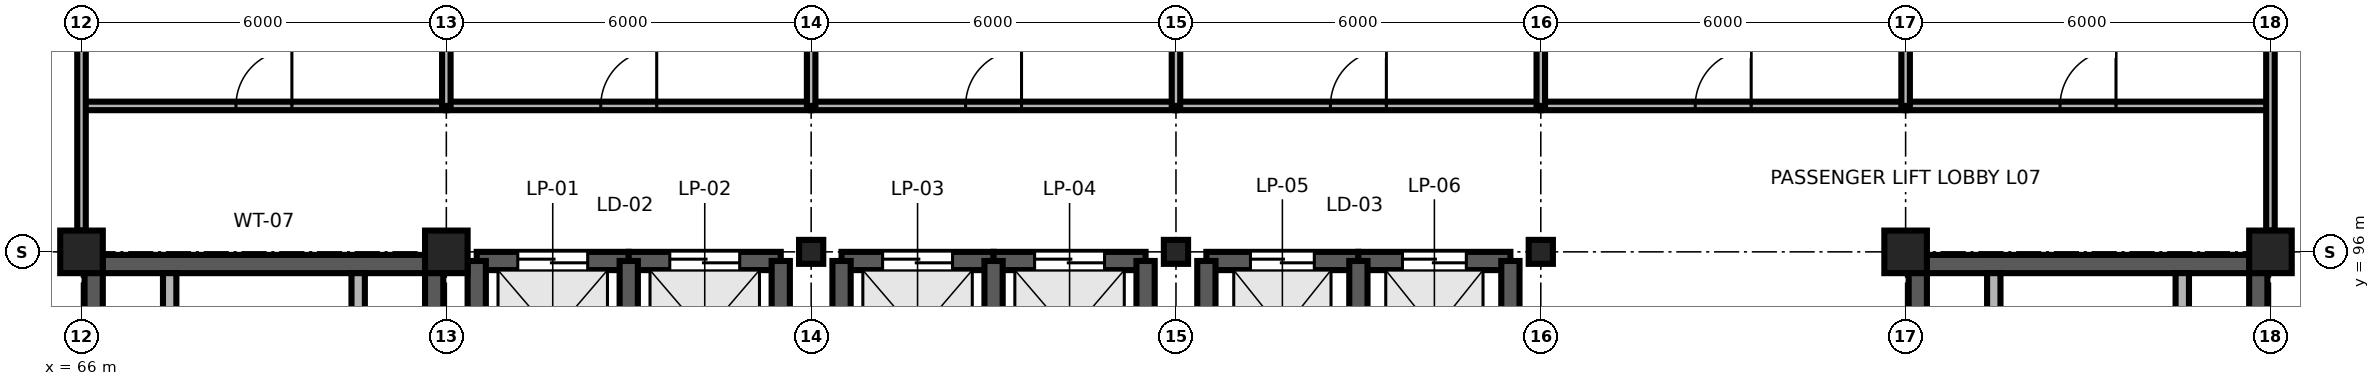
"""IFC4 building model, lengths in metres.
Left out: names, types, materials, properties, quantities, classifications, styles, units other than length and angle.
Written with IfcOpenShell. Run it as: python <this file> out.ifc"""

import sys

from ifc_helpers import new_model, si_unit, direction, frame, frame_2d, origin, origin_2d, place, context, subcontext, project, spatial, rectangle, i_section, extrude, element, fill, save


model = new_model("IFC4")
c1 = context("Model", 3, precision=1e-05, world=origin(), true_north=direction((0.0, 1.0)))
c2 = subcontext(c1, "Body", "Model", "MODEL_VIEW")
j1 = project(units=[si_unit("LENGTHUNIT", "METRE"), si_unit("PLANEANGLEUNIT", "RADIAN")], contexts=[c1])
p1 = place(None, origin())
s1 = spatial("IfcSite", under=j1, at=p1, CompositionType="ELEMENT")
p2 = place(p1, origin())
s2 = spatial("IfcBuilding", under=s1, at=p2, CompositionType="ELEMENT")
p3 = place(p2, frame((0.0, 0.0, 28.8)))
s3 = spatial("IfcBuildingStorey", under=s2, at=p3, CompositionType="ELEMENT", Elevation=28.8)
for number, where, z_axis, x_axis in (
    (1, (66.0, 96.0, 0.0), (0.0, 0.0, 1.0), (1.0, 0.0, 0.0)),
    (2, (72.0, 96.0, 0.0), (0.0, 0.0, 1.0), (1.0, 0.0, 0.0)),
):
    element("IfcColumn", number, at=place(p3, frame(where, z_axis=z_axis, x_axis=x_axis)), inside=s3, PredefinedType="COLUMN", context=c2, shape_type="SweptSolid", body=[
        extrude(rectangle(XDim=0.7, YDim=0.7, at=origin_2d()), origin(), (0.0, 0.0, 1.0), 3.9),
    ])
for number, where, z_axis, x_axis in (
    (3, (78.0, 96.0, 0.0), (0.0, 0.0, 1.0), (1.0, 0.0, 0.0)),
    (4, (84.0, 96.0, 0.0), (0.0, 0.0, 1.0), (1.0, 0.0, 0.0)),
    (5, (90.0, 96.0, 0.0), (0.0, 0.0, 1.0), (1.0, 0.0, 0.0)),
):
    element("IfcColumn", number, at=place(p3, frame(where, z_axis=z_axis, x_axis=x_axis)), inside=s3, PredefinedType="COLUMN", context=c2, shape_type="SweptSolid", body=[
        extrude(i_section(OverallWidth=0.398, OverallDepth=0.394, WebThickness=0.011, FlangeThickness=0.018, FilletRadius=0.022, at=origin_2d()), origin(), (0.0, 0.0, 1.0), 3.9),
    ])
for number, where, z_axis, x_axis in (
    (6, (96.0, 96.0, 0.0), (0.0, 0.0, 1.0), (1.0, 0.0, 0.0)),
    (7, (102.0, 96.0, 0.0), (0.0, 0.0, 1.0), (1.0, 0.0, 0.0)),
):
    element("IfcColumn", number, at=place(p3, frame(where, z_axis=z_axis, x_axis=x_axis)), inside=s3, PredefinedType="COLUMN", context=c2, shape_type="SweptSolid", body=[
        extrude(rectangle(XDim=0.7, YDim=0.7, at=origin_2d()), origin(), (0.0, 0.0, 1.0), 3.9),
    ])
p4 = place(p3, frame((66.35, 95.8, 0.0), z_axis=(0.0, 0.0, 1.0), x_axis=(1.0, 0.0, 0.0)))
e8 = element("IfcWall", 8, at=p4, inside=s3, PredefinedType="SHEAR", context=c2, shape_type="SweptSolid", body=[
    extrude(rectangle(XDim=5.3, YDim=0.3, at=frame_2d((2.65, 0.0))), origin(), (0.0, 0.0, 1.0), 3.74),
])
for number, where, z_axis, x_axis in (
    (9, (66.2, 84.0, 0.0), (0.0, 0.0, 1.0), (0.0, 1.0, 0.0)),
    (10, (71.8, 84.0, 0.0), (0.0, 0.0, 1.0), (0.0, 1.0, 0.0)),
):
    element("IfcWall", number, at=place(p3, frame(where, z_axis=z_axis, x_axis=x_axis)), inside=s3, PredefinedType="SHEAR", context=c2, shape_type="SweptSolid", body=[
        extrude(rectangle(XDim=11.8, YDim=0.3, at=frame_2d((5.9, 0.0))), origin(), (0.0, 0.0, 1.0), 3.74),
    ])
for number, where, z_axis, x_axis in (
    (11, (67.45, 94.4, 0.0), (0.0, 0.0, 1.0), (0.0, 1.0, 0.0)),
    (12, (70.55, 94.4, 0.0), (0.0, 0.0, 1.0), (0.0, 1.0, 0.0)),
):
    element("IfcWall", number, at=place(p3, frame(where, z_axis=z_axis, x_axis=x_axis)), inside=s3, PredefinedType="PARTITIONING", context=c2, shape_type="SweptSolid", body=[
        extrude(rectangle(XDim=1.25, YDim=0.22, at=frame_2d((0.625, 0.0))), origin(), (0.0, 0.0, 1.0), 3.74),
    ])
p5 = place(p3, frame((96.35, 95.8, 0.0), z_axis=(0.0, 0.0, 1.0), x_axis=(1.0, 0.0, 0.0)))
e13 = element("IfcWall", 13, at=p5, inside=s3, PredefinedType="SHEAR", context=c2, shape_type="SweptSolid", body=[
    extrude(rectangle(XDim=5.3, YDim=0.3, at=frame_2d((2.65, 0.0))), origin(), (0.0, 0.0, 1.0), 3.74),
])
for number, where, z_axis, x_axis in (
    (14, (96.2, 84.0, 0.0), (0.0, 0.0, 1.0), (0.0, 1.0, 0.0)),
    (15, (101.8, 84.0, 0.0), (0.0, 0.0, 1.0), (0.0, 1.0, 0.0)),
):
    element("IfcWall", number, at=place(p3, frame(where, z_axis=z_axis, x_axis=x_axis)), inside=s3, PredefinedType="SHEAR", context=c2, shape_type="SweptSolid", body=[
        extrude(rectangle(XDim=11.8, YDim=0.3, at=frame_2d((5.9, 0.0))), origin(), (0.0, 0.0, 1.0), 3.74),
    ])
for number, where, z_axis, x_axis in (
    (16, (97.45, 94.4, 0.0), (0.0, 0.0, 1.0), (0.0, 1.0, 0.0)),
    (17, (100.55, 94.4, 0.0), (0.0, 0.0, 1.0), (0.0, 1.0, 0.0)),
):
    element("IfcWall", number, at=place(p3, frame(where, z_axis=z_axis, x_axis=x_axis)), inside=s3, PredefinedType="PARTITIONING", context=c2, shape_type="SweptSolid", body=[
        extrude(rectangle(XDim=1.25, YDim=0.22, at=frame_2d((0.625, 0.0))), origin(), (0.0, 0.0, 1.0), 3.74),
    ])
p6 = place(p3, frame((72.5, 95.85, 0.0), z_axis=(0.0, 0.0, 1.0), x_axis=(1.0, 0.0, 0.0)))
e18 = element("IfcWall", 18, at=p6, inside=s3, PredefinedType="SHEAR", context=c2, shape_type="SweptSolid", body=[
    extrude(rectangle(XDim=2.5, YDim=0.3, at=frame_2d((1.25, 0.0))), origin(), (0.0, 0.0, 1.0), 3.74),
])
p7 = place(p6, frame((0.675, 0.0, 0.0)))
e19 = element("IfcOpeningElement", 19, at=p7, cuts=e18, PredefinedType="OPENING", context=c2, shape_type="SweptSolid", body=[
    extrude(rectangle(XDim=1.15, YDim=2.15, at=frame_2d((0.575, 1.075))), frame((0.0, 0.165, 0.0), z_axis=(0.0, -1.0, 0.0), x_axis=(1.0, 0.0, 0.0)), (0.0, 0.0, 1.0), 0.33),
])
p8 = place(p3, frame((72.5, 92.45, 0.0), z_axis=(0.0, 0.0, 1.0), x_axis=(0.0, 1.0, 0.0)))
e20 = element("IfcWall", 20, at=p8, inside=s3, PredefinedType="SHEAR", context=c2, shape_type="SweptSolid", body=[
    extrude(rectangle(XDim=3.4, YDim=0.3, at=frame_2d((1.7, 0.0))), origin(), (0.0, 0.0, 1.0), 3.74),
])
p9 = place(p3, frame((75.0, 95.85, 0.0), z_axis=(0.0, 0.0, 1.0), x_axis=(1.0, 0.0, 0.0)))
e21 = element("IfcWall", 21, at=p9, inside=s3, PredefinedType="SHEAR", context=c2, shape_type="SweptSolid", body=[
    extrude(rectangle(XDim=2.5, YDim=0.3, at=frame_2d((1.25, 0.0))), origin(), (0.0, 0.0, 1.0), 3.74),
])
p10 = place(p9, frame((0.675, 0.0, 0.0)))
e22 = element("IfcOpeningElement", 22, at=p10, cuts=e21, PredefinedType="OPENING", context=c2, shape_type="SweptSolid", body=[
    extrude(rectangle(XDim=1.15, YDim=2.15, at=frame_2d((0.575, 1.075))), frame((0.0, 0.165, 0.0), z_axis=(0.0, -1.0, 0.0), x_axis=(1.0, 0.0, 0.0)), (0.0, 0.0, 1.0), 0.33),
])
for number, where, z_axis, x_axis in (
    (23, (75.0, 92.45, 0.0), (0.0, 0.0, 1.0), (0.0, 1.0, 0.0)),
    (24, (77.5, 92.45, 0.0), (0.0, 0.0, 1.0), (0.0, 1.0, 0.0)),
):
    element("IfcWall", number, at=place(p3, frame(where, z_axis=z_axis, x_axis=x_axis)), inside=s3, PredefinedType="SHEAR", context=c2, shape_type="SweptSolid", body=[
        extrude(rectangle(XDim=3.4, YDim=0.3, at=frame_2d((1.7, 0.0))), origin(), (0.0, 0.0, 1.0), 3.74),
    ])
p11 = place(p3, frame((78.5, 95.85, 0.0), z_axis=(0.0, 0.0, 1.0), x_axis=(1.0, 0.0, 0.0)))
e25 = element("IfcWall", 25, at=p11, inside=s3, PredefinedType="SHEAR", context=c2, shape_type="SweptSolid", body=[
    extrude(rectangle(XDim=2.5, YDim=0.3, at=frame_2d((1.25, 0.0))), origin(), (0.0, 0.0, 1.0), 3.74),
])
p12 = place(p11, frame((0.675, 0.0, 0.0)))
e26 = element("IfcOpeningElement", 26, at=p12, cuts=e25, PredefinedType="OPENING", context=c2, shape_type="SweptSolid", body=[
    extrude(rectangle(XDim=1.15, YDim=2.15, at=frame_2d((0.575, 1.075))), frame((0.0, 0.165, 0.0), z_axis=(0.0, -1.0, 0.0), x_axis=(1.0, 0.0, 0.0)), (0.0, 0.0, 1.0), 0.33),
])
p13 = place(p3, frame((78.5, 92.45, 0.0), z_axis=(0.0, 0.0, 1.0), x_axis=(0.0, 1.0, 0.0)))
e27 = element("IfcWall", 27, at=p13, inside=s3, PredefinedType="SHEAR", context=c2, shape_type="SweptSolid", body=[
    extrude(rectangle(XDim=3.4, YDim=0.3, at=frame_2d((1.7, 0.0))), origin(), (0.0, 0.0, 1.0), 3.74),
])
p14 = place(p3, frame((81.0, 95.85, 0.0), z_axis=(0.0, 0.0, 1.0), x_axis=(1.0, 0.0, 0.0)))
e28 = element("IfcWall", 28, at=p14, inside=s3, PredefinedType="SHEAR", context=c2, shape_type="SweptSolid", body=[
    extrude(rectangle(XDim=2.5, YDim=0.3, at=frame_2d((1.25, 0.0))), origin(), (0.0, 0.0, 1.0), 3.74),
])
p15 = place(p14, frame((0.675, 0.0, 0.0)))
e29 = element("IfcOpeningElement", 29, at=p15, cuts=e28, PredefinedType="OPENING", context=c2, shape_type="SweptSolid", body=[
    extrude(rectangle(XDim=1.15, YDim=2.15, at=frame_2d((0.575, 1.075))), frame((0.0, 0.165, 0.0), z_axis=(0.0, -1.0, 0.0), x_axis=(1.0, 0.0, 0.0)), (0.0, 0.0, 1.0), 0.33),
])
for number, where, z_axis, x_axis in (
    (30, (81.0, 92.45, 0.0), (0.0, 0.0, 1.0), (0.0, 1.0, 0.0)),
    (31, (83.5, 92.45, 0.0), (0.0, 0.0, 1.0), (0.0, 1.0, 0.0)),
):
    element("IfcWall", number, at=place(p3, frame(where, z_axis=z_axis, x_axis=x_axis)), inside=s3, PredefinedType="SHEAR", context=c2, shape_type="SweptSolid", body=[
        extrude(rectangle(XDim=3.4, YDim=0.3, at=frame_2d((1.7, 0.0))), origin(), (0.0, 0.0, 1.0), 3.74),
    ])
p16 = place(p3, frame((84.5, 95.85, 0.0), z_axis=(0.0, 0.0, 1.0), x_axis=(1.0, 0.0, 0.0)))
e32 = element("IfcWall", 32, at=p16, inside=s3, PredefinedType="SHEAR", context=c2, shape_type="SweptSolid", body=[
    extrude(rectangle(XDim=2.5, YDim=0.3, at=frame_2d((1.25, 0.0))), origin(), (0.0, 0.0, 1.0), 3.74),
])
p17 = place(p16, frame((0.725, 0.0, 0.0)))
e33 = element("IfcOpeningElement", 33, at=p17, cuts=e32, PredefinedType="OPENING", context=c2, shape_type="SweptSolid", body=[
    extrude(rectangle(XDim=1.05, YDim=2.1, at=frame_2d((0.525, 1.05))), frame((0.0, 0.165, 0.0), z_axis=(0.0, -1.0, 0.0), x_axis=(1.0, 0.0, 0.0)), (0.0, 0.0, 1.0), 0.33),
])
p18 = place(p3, frame((84.5, 92.45, 0.0), z_axis=(0.0, 0.0, 1.0), x_axis=(0.0, 1.0, 0.0)))
e34 = element("IfcWall", 34, at=p18, inside=s3, PredefinedType="SHEAR", context=c2, shape_type="SweptSolid", body=[
    extrude(rectangle(XDim=3.4, YDim=0.3, at=frame_2d((1.7, 0.0))), origin(), (0.0, 0.0, 1.0), 3.74),
])
p19 = place(p3, frame((87.0, 95.85, 0.0), z_axis=(0.0, 0.0, 1.0), x_axis=(1.0, 0.0, 0.0)))
e35 = element("IfcWall", 35, at=p19, inside=s3, PredefinedType="SHEAR", context=c2, shape_type="SweptSolid", body=[
    extrude(rectangle(XDim=2.5, YDim=0.3, at=frame_2d((1.25, 0.0))), origin(), (0.0, 0.0, 1.0), 3.74),
])
p20 = place(p19, frame((0.725, 0.0, 0.0)))
e36 = element("IfcOpeningElement", 36, at=p20, cuts=e35, PredefinedType="OPENING", context=c2, shape_type="SweptSolid", body=[
    extrude(rectangle(XDim=1.05, YDim=2.1, at=frame_2d((0.525, 1.05))), frame((0.0, 0.165, 0.0), z_axis=(0.0, -1.0, 0.0), x_axis=(1.0, 0.0, 0.0)), (0.0, 0.0, 1.0), 0.33),
])
for number, where, z_axis, x_axis in (
    (37, (87.0, 92.45, 0.0), (0.0, 0.0, 1.0), (0.0, 1.0, 0.0)),
    (38, (89.5, 92.45, 0.0), (0.0, 0.0, 1.0), (0.0, 1.0, 0.0)),
):
    element("IfcWall", number, at=place(p3, frame(where, z_axis=z_axis, x_axis=x_axis)), inside=s3, PredefinedType="SHEAR", context=c2, shape_type="SweptSolid", body=[
        extrude(rectangle(XDim=3.4, YDim=0.3, at=frame_2d((1.7, 0.0))), origin(), (0.0, 0.0, 1.0), 3.74),
    ])
p21 = place(p3, frame((66.0, 98.4, 0.0), z_axis=(0.0, 0.0, 1.0), x_axis=(1.0, 0.0, 0.0)))
e39 = element("IfcWall", 39, at=p21, inside=s3, PredefinedType="PARTITIONING", context=c2, shape_type="SweptSolid", body=[
    extrude(rectangle(XDim=6.0, YDim=0.14, at=frame_2d((3.0, 0.0))), origin(), (0.0, 0.0, 1.0), 3.74),
])
p22 = place(p21, frame((2.54, 0.0, 0.0)))
e40 = element("IfcOpeningElement", 40, at=p22, cuts=e39, PredefinedType="OPENING", context=c2, shape_type="SweptSolid", body=[
    extrude(rectangle(XDim=0.92, YDim=2.15, at=frame_2d((0.46, 1.075))), frame((0.0, 0.085, 0.0), z_axis=(0.0, -1.0, 0.0), x_axis=(1.0, 0.0, 0.0)), (0.0, 0.0, 1.0), 0.17),
])
p23 = place(p3, frame((72.0, 98.4, 0.0), z_axis=(0.0, 0.0, 1.0), x_axis=(1.0, 0.0, 0.0)))
e41 = element("IfcWall", 41, at=p23, inside=s3, PredefinedType="PARTITIONING", context=c2, shape_type="SweptSolid", body=[
    extrude(rectangle(XDim=6.0, YDim=0.14, at=frame_2d((3.0, 0.0))), origin(), (0.0, 0.0, 1.0), 3.74),
])
p24 = place(p23, frame((2.54, 0.0, 0.0)))
e42 = element("IfcOpeningElement", 42, at=p24, cuts=e41, PredefinedType="OPENING", context=c2, shape_type="SweptSolid", body=[
    extrude(rectangle(XDim=0.92, YDim=2.15, at=frame_2d((0.46, 1.075))), frame((0.0, 0.085, 0.0), z_axis=(0.0, -1.0, 0.0), x_axis=(1.0, 0.0, 0.0)), (0.0, 0.0, 1.0), 0.17),
])
p25 = place(p3, frame((78.0, 98.4, 0.0), z_axis=(0.0, 0.0, 1.0), x_axis=(1.0, 0.0, 0.0)))
e43 = element("IfcWall", 43, at=p25, inside=s3, PredefinedType="PARTITIONING", context=c2, shape_type="SweptSolid", body=[
    extrude(rectangle(XDim=6.0, YDim=0.14, at=frame_2d((3.0, 0.0))), origin(), (0.0, 0.0, 1.0), 3.74),
])
p26 = place(p25, frame((2.54, 0.0, 0.0)))
e44 = element("IfcOpeningElement", 44, at=p26, cuts=e43, PredefinedType="OPENING", context=c2, shape_type="SweptSolid", body=[
    extrude(rectangle(XDim=0.92, YDim=2.15, at=frame_2d((0.46, 1.075))), frame((0.0, 0.085, 0.0), z_axis=(0.0, -1.0, 0.0), x_axis=(1.0, 0.0, 0.0)), (0.0, 0.0, 1.0), 0.17),
])
p27 = place(p3, frame((84.0, 98.4, 0.0), z_axis=(0.0, 0.0, 1.0), x_axis=(1.0, 0.0, 0.0)))
e45 = element("IfcWall", 45, at=p27, inside=s3, PredefinedType="PARTITIONING", context=c2, shape_type="SweptSolid", body=[
    extrude(rectangle(XDim=6.0, YDim=0.14, at=frame_2d((3.0, 0.0))), origin(), (0.0, 0.0, 1.0), 3.74),
])
p28 = place(p27, frame((2.54, 0.0, 0.0)))
e46 = element("IfcOpeningElement", 46, at=p28, cuts=e45, PredefinedType="OPENING", context=c2, shape_type="SweptSolid", body=[
    extrude(rectangle(XDim=0.92, YDim=2.15, at=frame_2d((0.46, 1.075))), frame((0.0, 0.085, 0.0), z_axis=(0.0, -1.0, 0.0), x_axis=(1.0, 0.0, 0.0)), (0.0, 0.0, 1.0), 0.17),
])
p29 = place(p3, frame((90.0, 98.4, 0.0), z_axis=(0.0, 0.0, 1.0), x_axis=(1.0, 0.0, 0.0)))
e47 = element("IfcWall", 47, at=p29, inside=s3, PredefinedType="PARTITIONING", context=c2, shape_type="SweptSolid", body=[
    extrude(rectangle(XDim=6.0, YDim=0.14, at=frame_2d((3.0, 0.0))), origin(), (0.0, 0.0, 1.0), 3.74),
])
p30 = place(p29, frame((2.54, 0.0, 0.0)))
e48 = element("IfcOpeningElement", 48, at=p30, cuts=e47, PredefinedType="OPENING", context=c2, shape_type="SweptSolid", body=[
    extrude(rectangle(XDim=0.92, YDim=2.15, at=frame_2d((0.46, 1.075))), frame((0.0, 0.085, 0.0), z_axis=(0.0, -1.0, 0.0), x_axis=(1.0, 0.0, 0.0)), (0.0, 0.0, 1.0), 0.17),
])
p31 = place(p3, frame((96.0, 98.4, 0.0), z_axis=(0.0, 0.0, 1.0), x_axis=(1.0, 0.0, 0.0)))
e49 = element("IfcWall", 49, at=p31, inside=s3, PredefinedType="PARTITIONING", context=c2, shape_type="SweptSolid", body=[
    extrude(rectangle(XDim=6.0, YDim=0.14, at=frame_2d((3.0, 0.0))), origin(), (0.0, 0.0, 1.0), 3.74),
])
p32 = place(p31, frame((2.54, 0.0, 0.0)))
e50 = element("IfcOpeningElement", 50, at=p32, cuts=e49, PredefinedType="OPENING", context=c2, shape_type="SweptSolid", body=[
    extrude(rectangle(XDim=0.92, YDim=2.15, at=frame_2d((0.46, 1.075))), frame((0.0, 0.085, 0.0), z_axis=(0.0, -1.0, 0.0), x_axis=(1.0, 0.0, 0.0)), (0.0, 0.0, 1.0), 0.17),
])
for number, where, z_axis, x_axis in (
    (51, (72.0, 98.4, 0.0), (0.0, 0.0, 1.0), (0.0, 1.0, 0.0)),
    (52, (78.0, 98.4, 0.0), (0.0, 0.0, 1.0), (0.0, 1.0, 0.0)),
    (53, (84.0, 98.4, 0.0), (0.0, 0.0, 1.0), (0.0, 1.0, 0.0)),
    (54, (90.0, 98.4, 0.0), (0.0, 0.0, 1.0), (0.0, 1.0, 0.0)),
    (55, (96.0, 98.4, 0.0), (0.0, 0.0, 1.0), (0.0, 1.0, 0.0)),
):
    element("IfcWall", number, at=place(p3, frame(where, z_axis=z_axis, x_axis=x_axis)), inside=s3, PredefinedType="PARTITIONING", context=c2, shape_type="SweptSolid", body=[
        extrude(rectangle(XDim=8.95, YDim=0.14, at=frame_2d((4.475, 0.0))), origin(), (0.0, 0.0, 1.0), 3.352),
    ])
for number, where, z_axis, x_axis in (
    (56, (66.0, 96.35, 0.0), (0.0, 0.0, 1.0), (0.0, 1.0, 0.0)),
    (57, (102.0, 96.35, 0.0), (0.0, 0.0, 1.0), (0.0, 1.0, 0.0)),
):
    element("IfcWall", number, at=place(p3, frame(where, z_axis=z_axis, x_axis=x_axis)), inside=s3, PredefinedType="PARTITIONING", context=c2, shape_type="SweptSolid", body=[
        extrude(rectangle(XDim=11.3, YDim=0.14, at=frame_2d((5.65, 0.0))), origin(), (0.0, 0.0, 1.0), 3.352),
    ])
p33 = place(p7, origin())
e58 = element("IfcDoor", 58, at=p33, inside=s3, OperationType="DOUBLE_DOOR_SLIDING", PredefinedType="DOOR", context=c2, shape_type="SweptSolid", body=[
    extrude(rectangle(XDim=1.15, YDim=2.15, at=frame_2d((0.575, 1.075))), frame((0.0, 0.025, 0.0), z_axis=(0.0, -1.0, 0.0), x_axis=(1.0, 0.0, 0.0)), (0.0, 0.0, 1.0), 0.05),
])
fill(e19, e58)
p34 = place(p10, origin())
e59 = element("IfcDoor", 59, at=p34, inside=s3, OperationType="DOUBLE_DOOR_SLIDING", PredefinedType="DOOR", context=c2, shape_type="SweptSolid", body=[
    extrude(rectangle(XDim=1.15, YDim=2.15, at=frame_2d((0.575, 1.075))), frame((0.0, 0.025, 0.0), z_axis=(0.0, -1.0, 0.0), x_axis=(1.0, 0.0, 0.0)), (0.0, 0.0, 1.0), 0.05),
])
fill(e22, e59)
p35 = place(p12, origin())
e60 = element("IfcDoor", 60, at=p35, inside=s3, OperationType="DOUBLE_DOOR_SLIDING", PredefinedType="DOOR", context=c2, shape_type="SweptSolid", body=[
    extrude(rectangle(XDim=1.15, YDim=2.15, at=frame_2d((0.575, 1.075))), frame((0.0, 0.025, 0.0), z_axis=(0.0, -1.0, 0.0), x_axis=(1.0, 0.0, 0.0)), (0.0, 0.0, 1.0), 0.05),
])
fill(e26, e60)
p36 = place(p15, origin())
e61 = element("IfcDoor", 61, at=p36, inside=s3, OperationType="DOUBLE_DOOR_SLIDING", PredefinedType="DOOR", context=c2, shape_type="SweptSolid", body=[
    extrude(rectangle(XDim=1.15, YDim=2.15, at=frame_2d((0.575, 1.075))), frame((0.0, 0.025, 0.0), z_axis=(0.0, -1.0, 0.0), x_axis=(1.0, 0.0, 0.0)), (0.0, 0.0, 1.0), 0.05),
])
fill(e29, e61)
p37 = place(p17, origin())
e62 = element("IfcDoor", 62, at=p37, inside=s3, OperationType="DOUBLE_DOOR_SLIDING", PredefinedType="DOOR", context=c2, shape_type="SweptSolid", body=[
    extrude(rectangle(XDim=1.05, YDim=2.1, at=frame_2d((0.525, 1.05))), frame((0.0, 0.025, 0.0), z_axis=(0.0, -1.0, 0.0), x_axis=(1.0, 0.0, 0.0)), (0.0, 0.0, 1.0), 0.05),
])
fill(e33, e62)
p38 = place(p20, origin())
e63 = element("IfcDoor", 63, at=p38, inside=s3, OperationType="DOUBLE_DOOR_SLIDING", PredefinedType="DOOR", context=c2, shape_type="SweptSolid", body=[
    extrude(rectangle(XDim=1.05, YDim=2.1, at=frame_2d((0.525, 1.05))), frame((0.0, 0.025, 0.0), z_axis=(0.0, -1.0, 0.0), x_axis=(1.0, 0.0, 0.0)), (0.0, 0.0, 1.0), 0.05),
])
fill(e36, e63)
p39 = place(p22, origin())
e64 = element("IfcDoor", 64, at=p39, inside=s3, OperationType="SINGLE_SWING_RIGHT", PredefinedType="DOOR", context=c2, shape_type="SweptSolid", body=[
    extrude(rectangle(XDim=0.92, YDim=2.15, at=frame_2d((0.46, 1.075))), frame((0.0, 0.025, 0.0), z_axis=(0.0, -1.0, 0.0), x_axis=(1.0, 0.0, 0.0)), (0.0, 0.0, 1.0), 0.05),
])
fill(e40, e64)
p40 = place(p24, origin())
e65 = element("IfcDoor", 65, at=p40, inside=s3, OperationType="SINGLE_SWING_RIGHT", PredefinedType="DOOR", context=c2, shape_type="SweptSolid", body=[
    extrude(rectangle(XDim=0.92, YDim=2.15, at=frame_2d((0.46, 1.075))), frame((0.0, 0.025, 0.0), z_axis=(0.0, -1.0, 0.0), x_axis=(1.0, 0.0, 0.0)), (0.0, 0.0, 1.0), 0.05),
])
fill(e42, e65)
p41 = place(p26, origin())
e66 = element("IfcDoor", 66, at=p41, inside=s3, OperationType="SINGLE_SWING_RIGHT", PredefinedType="DOOR", context=c2, shape_type="SweptSolid", body=[
    extrude(rectangle(XDim=0.92, YDim=2.15, at=frame_2d((0.46, 1.075))), frame((0.0, 0.025, 0.0), z_axis=(0.0, -1.0, 0.0), x_axis=(1.0, 0.0, 0.0)), (0.0, 0.0, 1.0), 0.05),
])
fill(e44, e66)
p42 = place(p28, origin())
e67 = element("IfcDoor", 67, at=p42, inside=s3, OperationType="SINGLE_SWING_RIGHT", PredefinedType="DOOR", context=c2, shape_type="SweptSolid", body=[
    extrude(rectangle(XDim=0.92, YDim=2.15, at=frame_2d((0.46, 1.075))), frame((0.0, 0.025, 0.0), z_axis=(0.0, -1.0, 0.0), x_axis=(1.0, 0.0, 0.0)), (0.0, 0.0, 1.0), 0.05),
])
fill(e46, e67)
p43 = place(p30, origin())
e68 = element("IfcDoor", 68, at=p43, inside=s3, OperationType="SINGLE_SWING_RIGHT", PredefinedType="DOOR", context=c2, shape_type="SweptSolid", body=[
    extrude(rectangle(XDim=0.92, YDim=2.15, at=frame_2d((0.46, 1.075))), frame((0.0, 0.025, 0.0), z_axis=(0.0, -1.0, 0.0), x_axis=(1.0, 0.0, 0.0)), (0.0, 0.0, 1.0), 0.05),
])
fill(e48, e68)
p44 = place(p32, origin())
e69 = element("IfcDoor", 69, at=p44, inside=s3, OperationType="SINGLE_SWING_RIGHT", PredefinedType="DOOR", context=c2, shape_type="SweptSolid", body=[
    extrude(rectangle(XDim=0.92, YDim=2.15, at=frame_2d((0.46, 1.075))), frame((0.0, 0.025, 0.0), z_axis=(0.0, -1.0, 0.0), x_axis=(1.0, 0.0, 0.0)), (0.0, 0.0, 1.0), 0.05),
])
fill(e50, e69)
save(model, sys.argv[1])
